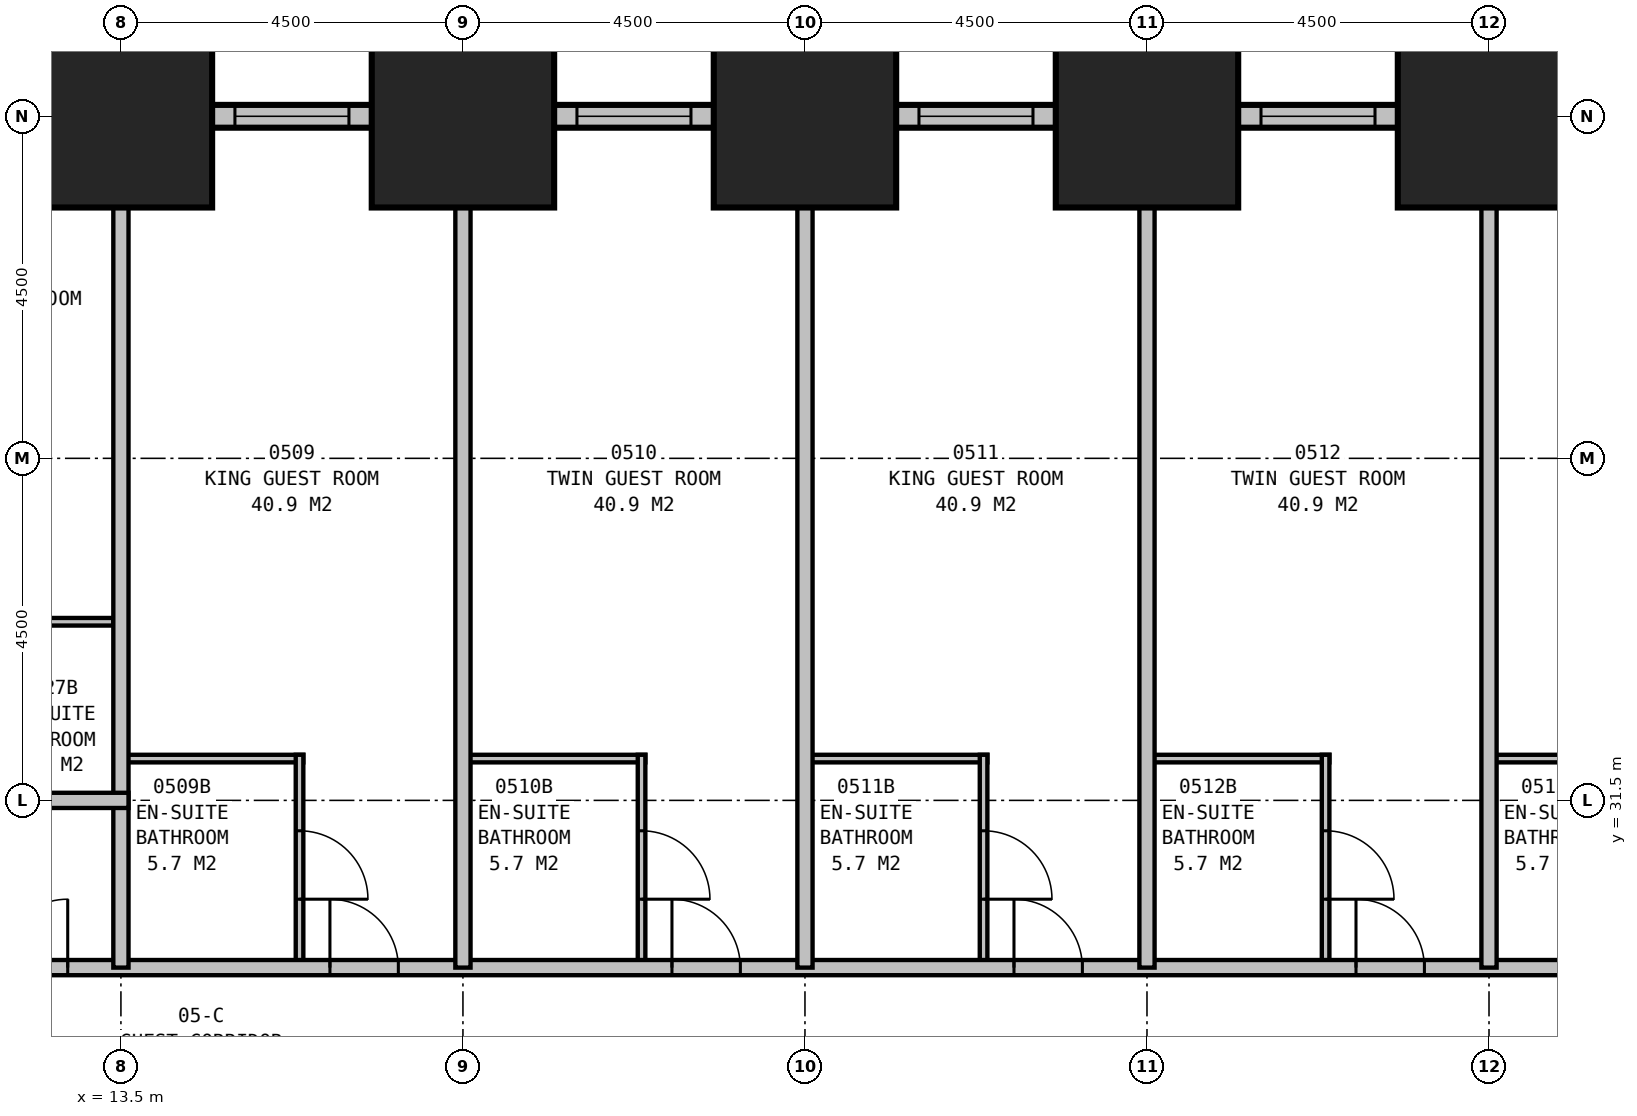
"""IFC4 building model, lengths in metres.
Left out: names, types, materials, properties, quantities, classifications, styles, units other than length and angle.
Written with IfcOpenShell. Run it as: python <this file> out.ifc"""

import sys

from ifc_helpers import new_model, si_unit, direction, frame, frame_2d, origin, origin_2d, place, context, subcontext, project, spatial, rectangle, extrude, element, fill, save


model = new_model("IFC4")
c1 = context("Model", 3, precision=1e-05, world=origin(), true_north=direction((0.0, 1.0)))
c2 = subcontext(c1, "Body", "Model", "MODEL_VIEW")
j1 = project(units=[si_unit("LENGTHUNIT", "METRE"), si_unit("PLANEANGLEUNIT", "RADIAN")], contexts=[c1])
p1 = place(None, origin())
s1 = spatial("IfcSite", under=j1, at=p1, CompositionType="ELEMENT")
p2 = place(p1, origin())
s2 = spatial("IfcBuilding", under=s1, at=p2, CompositionType="ELEMENT")
p3 = place(p2, frame((0.0, 0.0, 29.7)))
s3 = spatial("IfcBuildingStorey", under=s2, at=p3, CompositionType="ELEMENT", Elevation=29.7)
for number, where, z_axis, x_axis in (
    (1, (31.5, 40.5, 0.0), (0.0, 0.0, 1.0), (1.0, 0.0, 0.0)),
    (2, (27.0, 40.5, 0.0), (0.0, 0.0, 1.0), (1.0, 0.0, 0.0)),
    (3, (22.5, 40.5, 0.0), (0.0, 0.0, 1.0), (1.0, 0.0, 0.0)),
    (4, (18.0, 40.5, 0.0), (0.0, 0.0, 1.0), (1.0, 0.0, 0.0)),
    (5, (13.5, 40.5, 0.0), (0.0, 0.0, 1.0), (1.0, 0.0, 0.0)),
):
    element("IfcColumn", number, at=place(p3, frame(where, z_axis=z_axis, x_axis=x_axis)), inside=s3, PredefinedType="COLUMN", context=c2, shape_type="SweptSolid", body=[
        extrude(rectangle(XDim=2.4, YDim=2.4, at=origin_2d()), origin(), (0.0, 0.0, 1.0), 3.5),
    ])
p4 = place(p3, frame((40.65, 40.5, 0.0), z_axis=(0.0, 0.0, 1.0), x_axis=(-1.0, 0.0, 0.0)))
e6 = element("IfcWall", 6, at=p4, inside=s3, PredefinedType="STANDARD", context=c2, shape_type="SweptSolid", body=[
    extrude(rectangle(XDim=31.8, YDim=0.3, at=frame_2d((15.9, 0.0))), origin(), (0.0, 0.0, 1.0), 2.05),
])
p5 = place(p4, frame((1.65, 0.0, 0.5)))
e7 = element("IfcOpeningElement", 7, at=p5, cuts=e6, PredefinedType="OPENING", context=c2, shape_type="SweptSolid", body=[
    extrude(rectangle(XDim=1.5, YDim=1.4, at=frame_2d((0.75, 0.7))), frame((0.0, 0.16, 0.0), z_axis=(0.0, -1.0, 0.0), x_axis=(1.0, 0.0, 0.0)), (0.0, 0.0, 1.0), 0.32),
])
p6 = place(p4, frame((6.15, 0.0, 0.5)))
e8 = element("IfcOpeningElement", 8, at=p6, cuts=e6, PredefinedType="OPENING", context=c2, shape_type="SweptSolid", body=[
    extrude(rectangle(XDim=1.5, YDim=1.4, at=frame_2d((0.75, 0.7))), frame((0.0, 0.16, 0.0), z_axis=(0.0, -1.0, 0.0), x_axis=(1.0, 0.0, 0.0)), (0.0, 0.0, 1.0), 0.32),
])
p7 = place(p4, frame((10.65, 0.0, 0.5)))
e9 = element("IfcOpeningElement", 9, at=p7, cuts=e6, PredefinedType="OPENING", context=c2, shape_type="SweptSolid", body=[
    extrude(rectangle(XDim=1.5, YDim=1.4, at=frame_2d((0.75, 0.7))), frame((0.0, 0.16, 0.0), z_axis=(0.0, -1.0, 0.0), x_axis=(1.0, 0.0, 0.0)), (0.0, 0.0, 1.0), 0.32),
])
p8 = place(p4, frame((15.15, 0.0, 0.5)))
e10 = element("IfcOpeningElement", 10, at=p8, cuts=e6, PredefinedType="OPENING", context=c2, shape_type="SweptSolid", body=[
    extrude(rectangle(XDim=1.5, YDim=1.4, at=frame_2d((0.75, 0.7))), frame((0.0, 0.16, 0.0), z_axis=(0.0, -1.0, 0.0), x_axis=(1.0, 0.0, 0.0)), (0.0, 0.0, 1.0), 0.32),
])
p9 = place(p4, frame((19.65, 0.0, 0.5)))
e11 = element("IfcOpeningElement", 11, at=p9, cuts=e6, PredefinedType="OPENING", context=c2, shape_type="SweptSolid", body=[
    extrude(rectangle(XDim=1.5, YDim=1.4, at=frame_2d((0.75, 0.7))), frame((0.0, 0.16, 0.0), z_axis=(0.0, -1.0, 0.0), x_axis=(1.0, 0.0, 0.0)), (0.0, 0.0, 1.0), 0.32),
])
p10 = place(p4, frame((24.15, 0.0, 0.5)))
e12 = element("IfcOpeningElement", 12, at=p10, cuts=e6, PredefinedType="OPENING", context=c2, shape_type="SweptSolid", body=[
    extrude(rectangle(XDim=1.5, YDim=1.4, at=frame_2d((0.75, 0.7))), frame((0.0, 0.16, 0.0), z_axis=(0.0, -1.0, 0.0), x_axis=(1.0, 0.0, 0.0)), (0.0, 0.0, 1.0), 0.32),
])
p11 = place(p4, frame((28.65, 0.0, 0.5)))
e13 = element("IfcOpeningElement", 13, at=p11, cuts=e6, PredefinedType="OPENING", context=c2, shape_type="SweptSolid", body=[
    extrude(rectangle(XDim=1.5, YDim=1.4, at=frame_2d((0.75, 0.7))), frame((0.0, 0.16, 0.0), z_axis=(0.0, -1.0, 0.0), x_axis=(1.0, 0.0, 0.0)), (0.0, 0.0, 1.0), 0.32),
])
p12 = place(p3, frame((11.2, 29.3, 0.0), z_axis=(0.0, 0.0, 1.0), x_axis=(1.0, 0.0, 0.0)))
e14 = element("IfcWall", 14, at=p12, inside=s3, PredefinedType="PARTITIONING", context=c2, shape_type="SweptSolid", body=[
    extrude(rectangle(XDim=27.1, YDim=0.2, at=frame_2d((13.55, 0.0))), origin(), (0.0, 0.0, 1.0), 3.25),
])
p13 = place(p12, frame((5.05, 0.0, 0.0)))
e15 = element("IfcOpeningElement", 15, at=p13, cuts=e14, PredefinedType="OPENING", context=c2, shape_type="SweptSolid", body=[
    extrude(rectangle(XDim=0.9, YDim=2.1, at=frame_2d((0.45, 1.05))), frame((0.0, 0.11, 0.0), z_axis=(0.0, -1.0, 0.0), x_axis=(1.0, 0.0, 0.0)), (0.0, 0.0, 1.0), 0.22),
])
p14 = place(p12, frame((9.55, 0.0, 0.0)))
e16 = element("IfcOpeningElement", 16, at=p14, cuts=e14, PredefinedType="OPENING", context=c2, shape_type="SweptSolid", body=[
    extrude(rectangle(XDim=0.9, YDim=2.1, at=frame_2d((0.45, 1.05))), frame((0.0, 0.11, 0.0), z_axis=(0.0, -1.0, 0.0), x_axis=(1.0, 0.0, 0.0)), (0.0, 0.0, 1.0), 0.22),
])
p15 = place(p12, frame((14.05, 0.0, 0.0)))
e17 = element("IfcOpeningElement", 17, at=p15, cuts=e14, PredefinedType="OPENING", context=c2, shape_type="SweptSolid", body=[
    extrude(rectangle(XDim=0.9, YDim=2.1, at=frame_2d((0.45, 1.05))), frame((0.0, 0.11, 0.0), z_axis=(0.0, -1.0, 0.0), x_axis=(1.0, 0.0, 0.0)), (0.0, 0.0, 1.0), 0.22),
])
p16 = place(p12, frame((18.55, 0.0, 0.0)))
e18 = element("IfcOpeningElement", 18, at=p16, cuts=e14, PredefinedType="OPENING", context=c2, shape_type="SweptSolid", body=[
    extrude(rectangle(XDim=0.9, YDim=2.1, at=frame_2d((0.45, 1.05))), frame((0.0, 0.11, 0.0), z_axis=(0.0, -1.0, 0.0), x_axis=(1.0, 0.0, 0.0)), (0.0, 0.0, 1.0), 0.22),
])
p17 = place(p12, frame((23.05, 0.0, 0.0)))
e19 = element("IfcOpeningElement", 19, at=p17, cuts=e14, PredefinedType="OPENING", context=c2, shape_type="SweptSolid", body=[
    extrude(rectangle(XDim=0.9, YDim=2.1, at=frame_2d((0.45, 1.05))), frame((0.0, 0.11, 0.0), z_axis=(0.0, -1.0, 0.0), x_axis=(1.0, 0.0, 0.0)), (0.0, 0.0, 1.0), 0.22),
])
p18 = place(p12, frame((25.5, 0.0, 0.0)))
e20 = element("IfcOpeningElement", 20, at=p18, cuts=e14, PredefinedType="OPENING", context=c2, shape_type="SweptSolid", body=[
    extrude(rectangle(XDim=0.9, YDim=2.1, at=frame_2d((0.45, 1.05))), frame((0.0, 0.11, 0.0), z_axis=(0.0, -1.0, 0.0), x_axis=(1.0, 0.0, 0.0)), (0.0, 0.0, 1.0), 0.22),
])
p19 = place(p12, frame((0.7, 0.0, 0.0)))
e21 = element("IfcOpeningElement", 21, at=p19, cuts=e14, PredefinedType="OPENING", context=c2, shape_type="SweptSolid", body=[
    extrude(rectangle(XDim=0.9, YDim=2.1, at=frame_2d((0.45, 1.05))), frame((0.0, 0.11, 0.0), z_axis=(0.0, -1.0, 0.0), x_axis=(1.0, 0.0, 0.0)), (0.0, 0.0, 1.0), 0.22),
])
for number, where, z_axis, x_axis in (
    (22, (18.0, 29.3, 0.0), (0.0, 0.0, 1.0), (0.0, 1.0, 0.0)),
    (23, (22.5, 29.3, 0.0), (0.0, 0.0, 1.0), (0.0, 1.0, 0.0)),
    (24, (27.0, 29.3, 0.0), (0.0, 0.0, 1.0), (0.0, 1.0, 0.0)),
    (25, (31.5, 29.3, 0.0), (0.0, 0.0, 1.0), (0.0, 1.0, 0.0)),
):
    element("IfcWall", number, at=place(p3, frame(where, z_axis=z_axis, x_axis=x_axis)), inside=s3, PredefinedType="PARTITIONING", context=c2, shape_type="SweptSolid", body=[
        extrude(rectangle(XDim=11.2, YDim=0.2, at=frame_2d((5.6, 0.0))), origin(), (0.0, 0.0, 1.0), 2.25),
    ])
p20 = place(p3, frame((13.5, 32.05, 0.0), z_axis=(0.0, 0.0, 1.0), x_axis=(1.0, 0.0, 0.0)))
e26 = element("IfcWall", 26, at=p20, inside=s3, PredefinedType="PLUMBINGWALL", context=c2, shape_type="SweptSolid", body=[
    extrude(rectangle(XDim=2.4, YDim=0.1, at=frame_2d((1.2, 0.0))), origin(), (0.0, 0.0, 1.0), 3.25),
])
p21 = place(p3, frame((15.85, 29.3, 0.0), z_axis=(0.0, 0.0, 1.0), x_axis=(0.0, 1.0, 0.0)))
e27 = element("IfcWall", 27, at=p21, inside=s3, PredefinedType="PLUMBINGWALL", context=c2, shape_type="SweptSolid", body=[
    extrude(rectangle(XDim=2.8, YDim=0.1, at=frame_2d((1.4, 0.0))), origin(), (0.0, 0.0, 1.0), 3.25),
])
p22 = place(p21, frame((1.8, 0.0, 0.0), z_axis=(0.0, 0.0, 1.0), x_axis=(-1.0, 0.0, 0.0)))
e28 = element("IfcOpeningElement", 28, at=p22, cuts=e27, PredefinedType="OPENING", context=c2, shape_type="SweptSolid", body=[
    extrude(rectangle(XDim=0.9, YDim=2.1, at=frame_2d((0.45, 1.05))), frame((0.0, 0.06, 0.0), z_axis=(0.0, -1.0, 0.0), x_axis=(1.0, 0.0, 0.0)), (0.0, 0.0, 1.0), 0.12),
])
p23 = place(p3, frame((18.0, 32.05, 0.0), z_axis=(0.0, 0.0, 1.0), x_axis=(1.0, 0.0, 0.0)))
e29 = element("IfcWall", 29, at=p23, inside=s3, PredefinedType="PLUMBINGWALL", context=c2, shape_type="SweptSolid", body=[
    extrude(rectangle(XDim=2.4, YDim=0.1, at=frame_2d((1.2, 0.0))), origin(), (0.0, 0.0, 1.0), 3.25),
])
p24 = place(p3, frame((20.35, 29.3, 0.0), z_axis=(0.0, 0.0, 1.0), x_axis=(0.0, 1.0, 0.0)))
e30 = element("IfcWall", 30, at=p24, inside=s3, PredefinedType="PLUMBINGWALL", context=c2, shape_type="SweptSolid", body=[
    extrude(rectangle(XDim=2.8, YDim=0.1, at=frame_2d((1.4, 0.0))), origin(), (0.0, 0.0, 1.0), 3.25),
])
p25 = place(p24, frame((1.8, 0.0, 0.0), z_axis=(0.0, 0.0, 1.0), x_axis=(-1.0, 0.0, 0.0)))
e31 = element("IfcOpeningElement", 31, at=p25, cuts=e30, PredefinedType="OPENING", context=c2, shape_type="SweptSolid", body=[
    extrude(rectangle(XDim=0.9, YDim=2.1, at=frame_2d((0.45, 1.05))), frame((0.0, 0.06, 0.0), z_axis=(0.0, -1.0, 0.0), x_axis=(1.0, 0.0, 0.0)), (0.0, 0.0, 1.0), 0.12),
])
p26 = place(p3, frame((22.5, 32.05, 0.0), z_axis=(0.0, 0.0, 1.0), x_axis=(1.0, 0.0, 0.0)))
e32 = element("IfcWall", 32, at=p26, inside=s3, PredefinedType="PLUMBINGWALL", context=c2, shape_type="SweptSolid", body=[
    extrude(rectangle(XDim=2.4, YDim=0.1, at=frame_2d((1.2, 0.0))), origin(), (0.0, 0.0, 1.0), 3.25),
])
p27 = place(p3, frame((24.85, 29.3, 0.0), z_axis=(0.0, 0.0, 1.0), x_axis=(0.0, 1.0, 0.0)))
e33 = element("IfcWall", 33, at=p27, inside=s3, PredefinedType="PLUMBINGWALL", context=c2, shape_type="SweptSolid", body=[
    extrude(rectangle(XDim=2.8, YDim=0.1, at=frame_2d((1.4, 0.0))), origin(), (0.0, 0.0, 1.0), 3.25),
])
p28 = place(p27, frame((1.8, 0.0, 0.0), z_axis=(0.0, 0.0, 1.0), x_axis=(-1.0, 0.0, 0.0)))
e34 = element("IfcOpeningElement", 34, at=p28, cuts=e33, PredefinedType="OPENING", context=c2, shape_type="SweptSolid", body=[
    extrude(rectangle(XDim=0.9, YDim=2.1, at=frame_2d((0.45, 1.05))), frame((0.0, 0.06, 0.0), z_axis=(0.0, -1.0, 0.0), x_axis=(1.0, 0.0, 0.0)), (0.0, 0.0, 1.0), 0.12),
])
p29 = place(p3, frame((27.0, 32.05, 0.0), z_axis=(0.0, 0.0, 1.0), x_axis=(1.0, 0.0, 0.0)))
e35 = element("IfcWall", 35, at=p29, inside=s3, PredefinedType="PLUMBINGWALL", context=c2, shape_type="SweptSolid", body=[
    extrude(rectangle(XDim=2.4, YDim=0.1, at=frame_2d((1.2, 0.0))), origin(), (0.0, 0.0, 1.0), 3.25),
])
p30 = place(p3, frame((29.35, 29.3, 0.0), z_axis=(0.0, 0.0, 1.0), x_axis=(0.0, 1.0, 0.0)))
e36 = element("IfcWall", 36, at=p30, inside=s3, PredefinedType="PLUMBINGWALL", context=c2, shape_type="SweptSolid", body=[
    extrude(rectangle(XDim=2.8, YDim=0.1, at=frame_2d((1.4, 0.0))), origin(), (0.0, 0.0, 1.0), 3.25),
])
p31 = place(p30, frame((1.8, 0.0, 0.0), z_axis=(0.0, 0.0, 1.0), x_axis=(-1.0, 0.0, 0.0)))
e37 = element("IfcOpeningElement", 37, at=p31, cuts=e36, PredefinedType="OPENING", context=c2, shape_type="SweptSolid", body=[
    extrude(rectangle(XDim=0.9, YDim=2.1, at=frame_2d((0.45, 1.05))), frame((0.0, 0.06, 0.0), z_axis=(0.0, -1.0, 0.0), x_axis=(1.0, 0.0, 0.0)), (0.0, 0.0, 1.0), 0.12),
])
p32 = place(p3, frame((31.5, 32.05, 0.0), z_axis=(0.0, 0.0, 1.0), x_axis=(1.0, 0.0, 0.0)))
e38 = element("IfcWall", 38, at=p32, inside=s3, PredefinedType="PLUMBINGWALL", context=c2, shape_type="SweptSolid", body=[
    extrude(rectangle(XDim=2.4, YDim=0.1, at=frame_2d((1.2, 0.0))), origin(), (0.0, 0.0, 1.0), 3.25),
])
p33 = place(p3, frame((13.5, 29.3, 0.0), z_axis=(0.0, 0.0, 1.0), x_axis=(0.0, 1.0, 0.0)))
e39 = element("IfcWall", 39, at=p33, inside=s3, PredefinedType="PARTITIONING", context=c2, shape_type="SweptSolid", body=[
    extrude(rectangle(XDim=11.2, YDim=0.2, at=frame_2d((5.6, 0.0))), origin(), (0.0, 0.0, 1.0), 2.25),
])
p34 = place(p3, frame((13.6, 31.5, 0.0), z_axis=(0.0, 0.0, 1.0), x_axis=(-1.0, 0.0, 0.0)))
e40 = element("IfcWall", 40, at=p34, inside=s3, PredefinedType="PARTITIONING", context=c2, shape_type="SweptSolid", body=[
    extrude(rectangle(XDim=10.099, YDim=0.2, at=frame_2d((5.05, 0.0))), origin(), (0.0, 0.0, 1.0), 3.25),
])
p35 = place(p34, frame((8.749, 0.0, 0.0), z_axis=(0.0, 0.0, 1.0), x_axis=(-1.0, 0.0, 0.0)))
e41 = element("IfcOpeningElement", 41, at=p35, cuts=e40, PredefinedType="OPENING", context=c2, shape_type="SweptSolid", body=[
    extrude(rectangle(XDim=0.9, YDim=2.1, at=frame_2d((0.45, 1.05))), frame((0.0, 0.11, 0.0), z_axis=(0.0, -1.0, 0.0), x_axis=(1.0, 0.0, 0.0)), (0.0, 0.0, 1.0), 0.22),
])
p36 = place(p3, frame((13.4, 33.85, 0.0), z_axis=(0.0, 0.0, 1.0), x_axis=(-1.0, 0.0, 0.0)))
e42 = element("IfcWall", 42, at=p36, inside=s3, PredefinedType="PLUMBINGWALL", context=c2, shape_type="SweptSolid", body=[
    extrude(rectangle(XDim=2.7, YDim=0.1, at=frame_2d((1.35, 0.0))), origin(), (0.0, 0.0, 1.0), 3.25),
])
p37 = place(p36, frame((1.8, 0.0, 0.0), z_axis=(0.0, 0.0, 1.0), x_axis=(-1.0, 0.0, 0.0)))
e43 = element("IfcOpeningElement", 43, at=p37, cuts=e42, PredefinedType="OPENING", context=c2, shape_type="SweptSolid", body=[
    extrude(rectangle(XDim=0.9, YDim=2.1, at=frame_2d((0.45, 1.05))), frame((0.0, 0.06, 0.0), z_axis=(0.0, -1.0, 0.0), x_axis=(1.0, 0.0, 0.0)), (0.0, 0.0, 1.0), 0.12),
])
p38 = place(p7, origin())
e44 = element("IfcWindow", 44, at=p38, inside=s3, PartitioningType="SINGLE_PANEL", PredefinedType="WINDOW", context=c2, shape_type="SweptSolid", body=[
    extrude(rectangle(XDim=1.5, YDim=1.4, at=frame_2d((0.75, 0.7))), frame((0.0, 0.03, 0.0), z_axis=(0.0, -1.0, 0.0), x_axis=(1.0, 0.0, 0.0)), (0.0, 0.0, 1.0), 0.06),
])
fill(e9, e44)
p39 = place(p8, origin())
e45 = element("IfcWindow", 45, at=p39, inside=s3, PartitioningType="SINGLE_PANEL", PredefinedType="WINDOW", context=c2, shape_type="SweptSolid", body=[
    extrude(rectangle(XDim=1.5, YDim=1.4, at=frame_2d((0.75, 0.7))), frame((0.0, 0.03, 0.0), z_axis=(0.0, -1.0, 0.0), x_axis=(1.0, 0.0, 0.0)), (0.0, 0.0, 1.0), 0.06),
])
fill(e10, e45)
p40 = place(p9, origin())
e46 = element("IfcWindow", 46, at=p40, inside=s3, PartitioningType="SINGLE_PANEL", PredefinedType="WINDOW", context=c2, shape_type="SweptSolid", body=[
    extrude(rectangle(XDim=1.5, YDim=1.4, at=frame_2d((0.75, 0.7))), frame((0.0, 0.03, 0.0), z_axis=(0.0, -1.0, 0.0), x_axis=(1.0, 0.0, 0.0)), (0.0, 0.0, 1.0), 0.06),
])
fill(e11, e46)
p41 = place(p10, origin())
e47 = element("IfcWindow", 47, at=p41, inside=s3, PartitioningType="SINGLE_PANEL", PredefinedType="WINDOW", context=c2, shape_type="SweptSolid", body=[
    extrude(rectangle(XDim=1.5, YDim=1.4, at=frame_2d((0.75, 0.7))), frame((0.0, 0.03, 0.0), z_axis=(0.0, -1.0, 0.0), x_axis=(1.0, 0.0, 0.0)), (0.0, 0.0, 1.0), 0.06),
])
fill(e12, e47)
p42 = place(p13, origin())
e48 = element("IfcDoor", 48, at=p42, inside=s3, OperationType="SINGLE_SWING_LEFT", PredefinedType="DOOR", context=c2, shape_type="SweptSolid", body=[
    extrude(rectangle(XDim=0.9, YDim=2.1, at=frame_2d((0.45, 1.05))), frame((0.0, 0.025, 0.0), z_axis=(0.0, -1.0, 0.0), x_axis=(1.0, 0.0, 0.0)), (0.0, 0.0, 1.0), 0.05),
])
fill(e15, e48)
p43 = place(p14, origin())
e49 = element("IfcDoor", 49, at=p43, inside=s3, OperationType="SINGLE_SWING_LEFT", PredefinedType="DOOR", context=c2, shape_type="SweptSolid", body=[
    extrude(rectangle(XDim=0.9, YDim=2.1, at=frame_2d((0.45, 1.05))), frame((0.0, 0.025, 0.0), z_axis=(0.0, -1.0, 0.0), x_axis=(1.0, 0.0, 0.0)), (0.0, 0.0, 1.0), 0.05),
])
fill(e16, e49)
p44 = place(p15, origin())
e50 = element("IfcDoor", 50, at=p44, inside=s3, OperationType="SINGLE_SWING_LEFT", PredefinedType="DOOR", context=c2, shape_type="SweptSolid", body=[
    extrude(rectangle(XDim=0.9, YDim=2.1, at=frame_2d((0.45, 1.05))), frame((0.0, 0.025, 0.0), z_axis=(0.0, -1.0, 0.0), x_axis=(1.0, 0.0, 0.0)), (0.0, 0.0, 1.0), 0.05),
])
fill(e17, e50)
p45 = place(p16, origin())
e51 = element("IfcDoor", 51, at=p45, inside=s3, OperationType="SINGLE_SWING_LEFT", PredefinedType="DOOR", context=c2, shape_type="SweptSolid", body=[
    extrude(rectangle(XDim=0.9, YDim=2.1, at=frame_2d((0.45, 1.05))), frame((0.0, 0.025, 0.0), z_axis=(0.0, -1.0, 0.0), x_axis=(1.0, 0.0, 0.0)), (0.0, 0.0, 1.0), 0.05),
])
fill(e18, e51)
p46 = place(p19, origin())
e52 = element("IfcDoor", 52, at=p46, inside=s3, OperationType="SINGLE_SWING_RIGHT", PredefinedType="DOOR", context=c2, shape_type="SweptSolid", body=[
    extrude(rectangle(XDim=0.9, YDim=2.1, at=frame_2d((0.45, 1.05))), frame((0.0, 0.025, 0.0), z_axis=(0.0, -1.0, 0.0), x_axis=(1.0, 0.0, 0.0)), (0.0, 0.0, 1.0), 0.05),
])
fill(e21, e52)
p47 = place(p22, origin())
e53 = element("IfcDoor", 53, at=p47, inside=s3, OperationType="SINGLE_SWING_RIGHT", PredefinedType="DOOR", context=c2, shape_type="SweptSolid", body=[
    extrude(rectangle(XDim=0.9, YDim=2.1, at=frame_2d((0.45, 1.05))), frame((0.0, 0.025, 0.0), z_axis=(0.0, -1.0, 0.0), x_axis=(1.0, 0.0, 0.0)), (0.0, 0.0, 1.0), 0.05),
])
fill(e28, e53)
p48 = place(p25, origin())
e54 = element("IfcDoor", 54, at=p48, inside=s3, OperationType="SINGLE_SWING_RIGHT", PredefinedType="DOOR", context=c2, shape_type="SweptSolid", body=[
    extrude(rectangle(XDim=0.9, YDim=2.1, at=frame_2d((0.45, 1.05))), frame((0.0, 0.025, 0.0), z_axis=(0.0, -1.0, 0.0), x_axis=(1.0, 0.0, 0.0)), (0.0, 0.0, 1.0), 0.05),
])
fill(e31, e54)
p49 = place(p28, origin())
e55 = element("IfcDoor", 55, at=p49, inside=s3, OperationType="SINGLE_SWING_RIGHT", PredefinedType="DOOR", context=c2, shape_type="SweptSolid", body=[
    extrude(rectangle(XDim=0.9, YDim=2.1, at=frame_2d((0.45, 1.05))), frame((0.0, 0.025, 0.0), z_axis=(0.0, -1.0, 0.0), x_axis=(1.0, 0.0, 0.0)), (0.0, 0.0, 1.0), 0.05),
])
fill(e34, e55)
p50 = place(p31, origin())
e56 = element("IfcDoor", 56, at=p50, inside=s3, OperationType="SINGLE_SWING_RIGHT", PredefinedType="DOOR", context=c2, shape_type="SweptSolid", body=[
    extrude(rectangle(XDim=0.9, YDim=2.1, at=frame_2d((0.45, 1.05))), frame((0.0, 0.025, 0.0), z_axis=(0.0, -1.0, 0.0), x_axis=(1.0, 0.0, 0.0)), (0.0, 0.0, 1.0), 0.05),
])
fill(e37, e56)
save(model, sys.argv[1])
